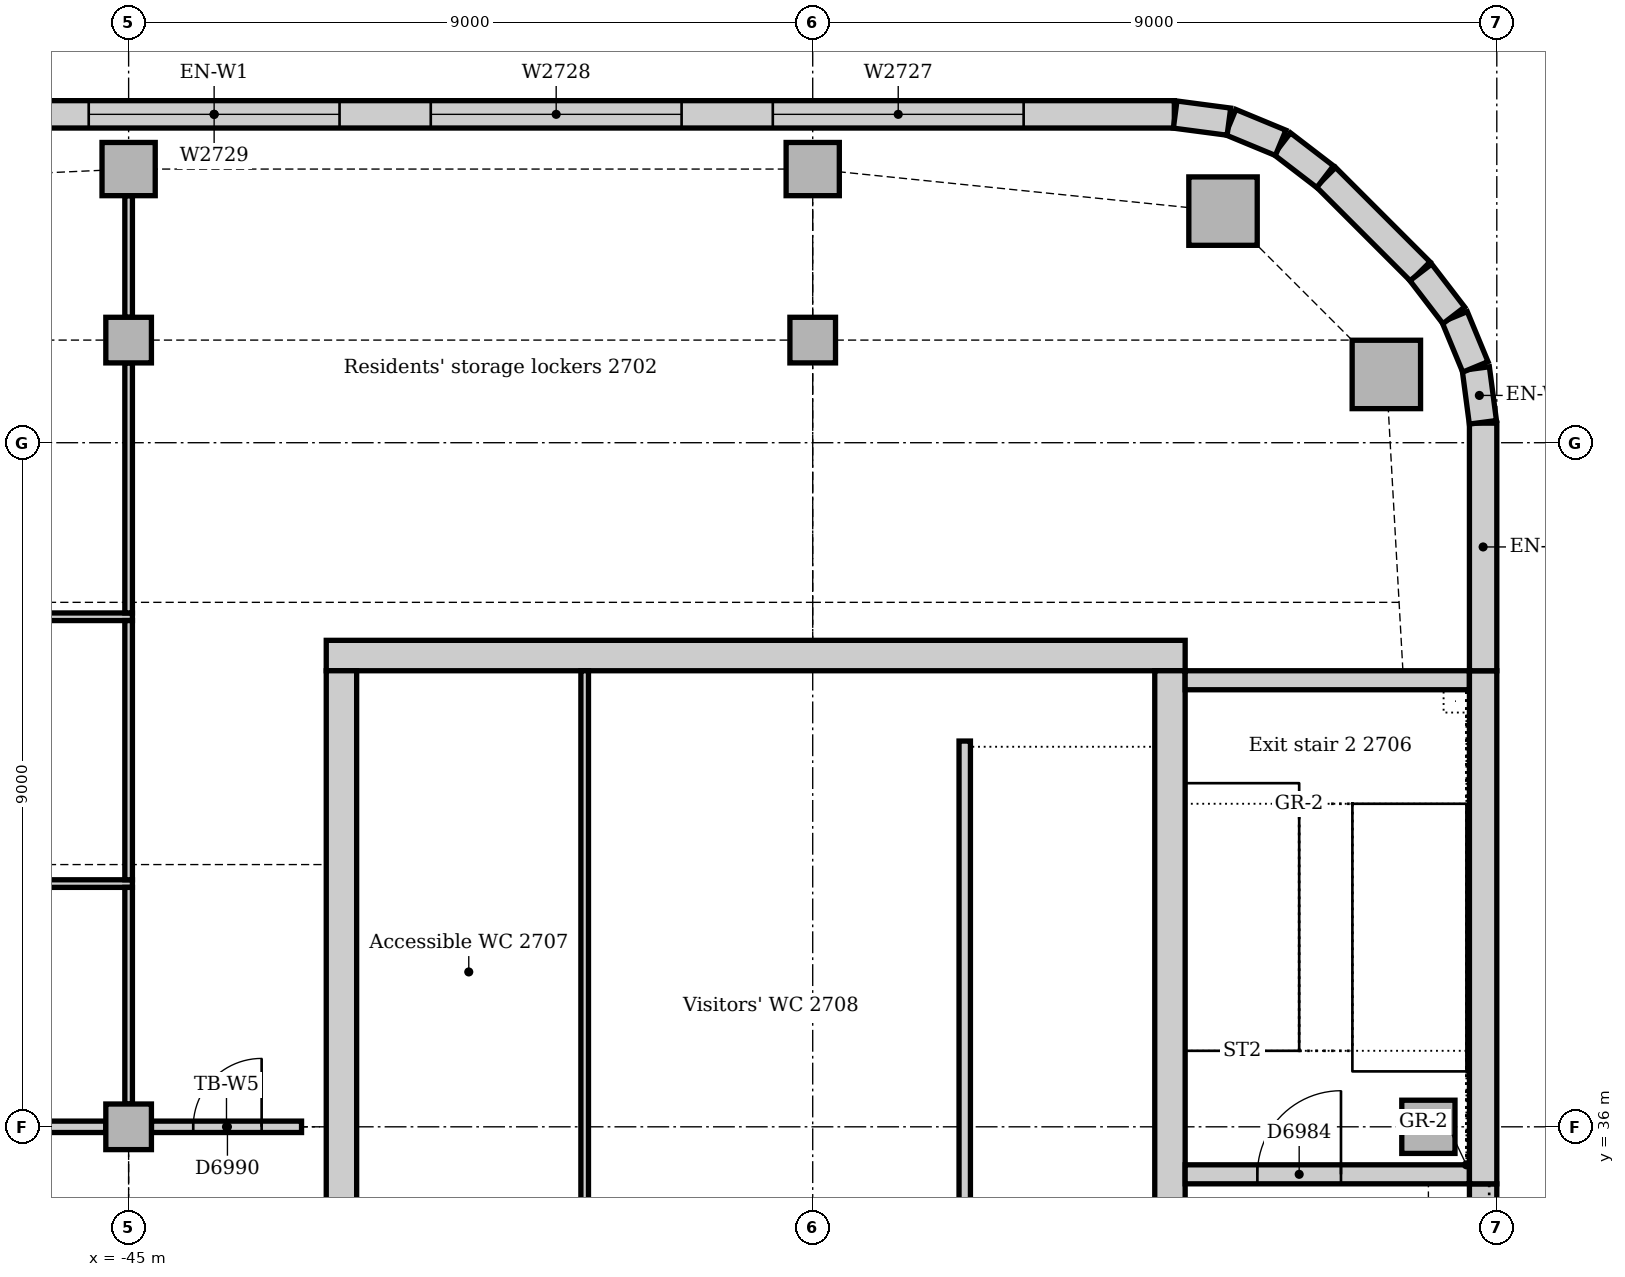
"""IFC4 building model, lengths in metres.
Left out: names, types, materials, properties, quantities, classifications, styles, units other than length and angle.
Written with IfcOpenShell. Run it as: python <this file> out.ifc"""

import sys

from ifc_helpers import new_model, si_unit, direction, frame, frame_2d, origin, origin_2d, place, context, subcontext, project, spatial, rectangle, extrude, element, fill, save


model = new_model("IFC4")
c1 = context("Model", 3, precision=1e-05, world=origin(), true_north=direction((0.0, 1.0)))
c2 = subcontext(c1, "Body", "Model", "MODEL_VIEW")
j1 = project(units=[si_unit("LENGTHUNIT", "METRE"), si_unit("PLANEANGLEUNIT", "RADIAN")], contexts=[c1])
p1 = place(None, origin())
s1 = spatial("IfcSite", under=j1, at=p1, CompositionType="ELEMENT")
p2 = place(p1, origin())
s2 = spatial("IfcBuilding", under=s1, at=p2, CompositionType="ELEMENT")
p3 = place(p2, frame((0.0, 0.0, 116.0)))
s3 = spatial("IfcBuildingStorey", under=s2, at=p3, CompositionType="ELEMENT", Elevation=116.0)
p4 = place(p3, frame((-31.1, 42.2, 0.0), z_axis=(0.0, 0.0, 1.0), x_axis=(-1.0, 0.0, 0.0)))
e1 = element("IfcWall", 1, at=p4, inside=s3, PredefinedType="SOLIDWALL", context=c2, shape_type="SweptSolid", body=[
    extrude(rectangle(XDim=11.3, YDim=0.4, at=frame_2d((5.65, 0.0))), origin(), (0.0, 0.0, 1.0), 4.0),
])
p5 = place(p3, frame((-31.3, 30.5, 0.0), z_axis=(0.0, 0.0, 1.0), x_axis=(0.0, 1.0, 0.0)))
e2 = element("IfcWall", 2, at=p5, inside=s3, PredefinedType="SOLIDWALL", context=c2, shape_type="SweptSolid", body=[
    extrude(rectangle(XDim=11.5, YDim=0.4, at=frame_2d((5.75, 0.0))), origin(), (0.0, 0.0, 1.0), 4.0),
])
p6 = place(p5, frame((0.85, 0.0, 0.0)))
e3 = element("IfcOpeningElement", 3, at=p6, cuts=e2, PredefinedType="OPENING", context=c2, shape_type="SweptSolid", body=[
    extrude(rectangle(XDim=1.8, YDim=2.1, at=frame_2d((0.9, 1.05))), frame((0.0, 0.21, 0.0), z_axis=(0.0, -1.0, 0.0), x_axis=(1.0, 0.0, 0.0)), (0.0, 0.0, 1.0), 0.42),
])
p7 = place(p3, frame((-42.2, 42.0, 0.0), z_axis=(0.0, 0.0, 1.0), x_axis=(0.0, -1.0, 0.0)))
e4 = element("IfcWall", 4, at=p7, inside=s3, PredefinedType="SOLIDWALL", context=c2, shape_type="SweptSolid", body=[
    extrude(rectangle(XDim=11.5, YDim=0.4, at=frame_2d((5.75, 0.0))), origin(), (0.0, 0.0, 1.0), 4.0),
])
p8 = place(p7, frame((8.85, 0.0, 0.0)))
e5 = element("IfcOpeningElement", 5, at=p8, cuts=e4, PredefinedType="OPENING", context=c2, shape_type="SweptSolid", body=[
    extrude(rectangle(XDim=1.8, YDim=2.1, at=frame_2d((0.9, 1.05))), frame((0.0, 0.21, 0.0), z_axis=(0.0, -1.0, 0.0), x_axis=(1.0, 0.0, 0.0)), (0.0, 0.0, 1.0), 0.42),
])
p9 = place(p3, frame((-31.1, 35.375, 0.0), z_axis=(0.0, 0.0, 1.0), x_axis=(1.0, 0.0, 0.0)))
e6 = element("IfcWall", 6, at=p9, inside=s3, PredefinedType="SOLIDWALL", context=c2, shape_type="SweptSolid", body=[
    extrude(rectangle(XDim=3.74, YDim=0.25, at=frame_2d((1.87, 0.0))), origin(), (0.0, 0.0, 1.0), 4.0),
])
p10 = place(p9, frame((0.95, 0.0, 0.0)))
e7 = element("IfcOpeningElement", 7, at=p10, cuts=e6, PredefinedType="OPENING", context=c2, shape_type="SweptSolid", body=[
    extrude(rectangle(XDim=1.1, YDim=2.1, at=frame_2d((0.55, 1.05))), frame((0.0, 0.135, 0.0), z_axis=(0.0, -1.0, 0.0), x_axis=(1.0, 0.0, 0.0)), (0.0, 0.0, 1.0), 0.27),
])
p11 = place(p3, frame((-27.36, 41.875, 0.0), z_axis=(0.0, 0.0, 1.0), x_axis=(-1.0, 0.0, 0.0)))
e8 = element("IfcWall", 8, at=p11, inside=s3, PredefinedType="SOLIDWALL", context=c2, shape_type="SweptSolid", body=[
    extrude(rectangle(XDim=3.74, YDim=0.25, at=frame_2d((1.87, 0.0))), origin(), (0.0, 0.0, 1.0), 4.0),
])
for number, where, z_axis, x_axis in (
    (9, (-28.453, 45.898, 0.0), (0.0, 0.0, 1.0), (1.0, 0.0, 0.0)),
    (10, (-30.602, 48.047, 0.0), (0.0, 0.0, 1.0), (1.0, 0.0, 0.0)),
):
    element("IfcColumn", number, at=place(p3, frame(where, z_axis=z_axis, x_axis=x_axis)), inside=s3, PredefinedType="COLUMN", context=c2, shape_type="SweptSolid", body=[
        extrude(rectangle(XDim=0.9, YDim=0.9, at=origin_2d()), origin(), (0.0, 0.0, 1.0), 3.85),
    ])
p12 = place(p3, frame((-27.9, 36.0, 0.0), z_axis=(0.0, 0.0, 1.0), x_axis=(1.0, 0.0, 0.0)))
e11 = element("IfcColumn", 11, at=p12, inside=s3, PredefinedType="COLUMN", context=c2, shape_type="SweptSolid", body=[
    extrude(rectangle(XDim=0.7, YDim=0.7, at=origin_2d()), origin(), (0.0, 0.0, 1.0), 4.0),
])
for number, where, z_axis, x_axis in (
    (12, (-45.0, 48.6, 0.0), (0.0, 0.0, 1.0), (1.0, 0.0, 0.0)),
    (13, (-36.0, 48.6, 0.0), (0.0, 0.0, 1.0), (1.0, 0.0, 0.0)),
):
    element("IfcColumn", number, at=place(p3, frame(where, z_axis=z_axis, x_axis=x_axis)), inside=s3, PredefinedType="COLUMN", context=c2, shape_type="SweptSolid", body=[
        extrude(rectangle(XDim=0.7, YDim=0.7, at=origin_2d()), origin(), (0.0, 0.0, 1.0), 3.85),
    ])
for number, where, z_axis, x_axis in (
    (14, (-45.0, 36.0, 0.0), (0.0, 0.0, 1.0), (1.0, 0.0, 0.0)),
    (15, (-45.0, 46.35, 0.0), (0.0, 0.0, 1.0), (1.0, 0.0, 0.0)),
    (16, (-36.0, 46.35, 0.0), (0.0, 0.0, 1.0), (1.0, 0.0, 0.0)),
):
    element("IfcColumn", number, at=place(p3, frame(where, z_axis=z_axis, x_axis=x_axis)), inside=s3, PredefinedType="COLUMN", context=c2, shape_type="SweptSolid", body=[
        extrude(rectangle(XDim=0.6, YDim=0.6, at=origin_2d()), origin(), (0.0, 0.0, 1.0), 3.85),
    ])
p13 = place(p3, frame((-27.18, 27.75, 0.0), z_axis=(0.0, 0.0, 1.0), x_axis=(0.0, 1.0, 0.0)))
e17 = element("IfcWall", 17, at=p13, inside=s3, PredefinedType="STANDARD", context=c2, shape_type="SweptSolid", body=[
    extrude(rectangle(XDim=7.5, YDim=0.36, at=frame_2d((3.75, 0.0))), origin(), (0.0, 0.0, 1.0), 3.85),
])
p14 = place(p13, frame((2.85, 0.0, 1.2)))
e18 = element("IfcOpeningElement", 18, at=p14, cuts=e17, PredefinedType="OPENING", context=c2, shape_type="SweptSolid", body=[
    extrude(rectangle(XDim=1.8, YDim=1.2, at=frame_2d((0.9, 0.6))), frame((0.0, 0.19, 0.0), z_axis=(0.0, -1.0, 0.0), x_axis=(1.0, 0.0, 0.0)), (0.0, 0.0, 1.0), 0.38),
])
p15 = place(p3, frame((-27.18, 35.25, 0.0), z_axis=(0.0, 0.0, 1.0), x_axis=(0.0, 1.0, 0.0)))
e19 = element("IfcWall", 19, at=p15, inside=s3, PredefinedType="STANDARD", context=c2, shape_type="SweptSolid", body=[
    extrude(rectangle(XDim=6.75, YDim=0.36, at=frame_2d((3.375, 0.0))), origin(), (0.0, 0.0, 1.0), 3.85),
])
p16 = place(p3, frame((-27.18, 42.0, 0.0), z_axis=(0.0, 0.0, 1.0), x_axis=(0.0, 1.0, 0.0)))
e20 = element("IfcWall", 20, at=p16, inside=s3, PredefinedType="STANDARD", context=c2, shape_type="SweptSolid", body=[
    extrude(rectangle(XDim=3.257, YDim=0.36, at=frame_2d((1.629, 0.0))), origin(), (0.0, 0.0, 1.0), 3.85),
])
p17 = place(p3, frame((-28.006, 47.251, 0.0), z_axis=(0.0, 0.0, 1.0), x_axis=(-0.707106781187, 0.707106781187, 0.0)))
e21 = element("IfcWall", 21, at=p17, inside=s3, PredefinedType="STANDARD", context=c2, shape_type="SweptSolid", body=[
    extrude(rectangle(XDim=1.757, YDim=0.36, at=frame_2d((0.879, 0.0))), origin(), (0.0, 0.0, 1.0), 3.85),
])
p18 = place(p3, frame((-31.243, 49.32, 0.0), z_axis=(0.0, 0.0, 1.0), x_axis=(-1.0, 0.0, 0.0)))
e22 = element("IfcWall", 22, at=p18, inside=s3, PredefinedType="STANDARD", context=c2, shape_type="SweptSolid", body=[
    extrude(rectangle(XDim=25.265, YDim=0.36, at=frame_2d((12.632, 0.0))), origin(), (0.0, 0.0, 1.0), 3.85),
])
p19 = place(p18, frame((1.982, 0.0, 0.9)))
e23 = element("IfcOpeningElement", 23, at=p19, cuts=e22, PredefinedType="OPENING", context=c2, shape_type="SweptSolid", body=[
    extrude(rectangle(XDim=3.3, YDim=1.6, at=frame_2d((1.65, 0.8))), frame((0.0, 0.19, 0.0), z_axis=(0.0, -1.0, 0.0), x_axis=(1.0, 0.0, 0.0)), (0.0, 0.0, 1.0), 0.38),
])
p20 = place(p18, frame((6.482, 0.0, 0.9)))
e24 = element("IfcOpeningElement", 24, at=p20, cuts=e22, PredefinedType="OPENING", context=c2, shape_type="SweptSolid", body=[
    extrude(rectangle(XDim=3.3, YDim=1.6, at=frame_2d((1.65, 0.8))), frame((0.0, 0.19, 0.0), z_axis=(0.0, -1.0, 0.0), x_axis=(1.0, 0.0, 0.0)), (0.0, 0.0, 1.0), 0.38),
])
p21 = place(p18, frame((10.982, 0.0, 0.9)))
e25 = element("IfcOpeningElement", 25, at=p21, cuts=e22, PredefinedType="OPENING", context=c2, shape_type="SweptSolid", body=[
    extrude(rectangle(XDim=3.3, YDim=1.6, at=frame_2d((1.65, 0.8))), frame((0.0, 0.19, 0.0), z_axis=(0.0, -1.0, 0.0), x_axis=(1.0, 0.0, 0.0)), (0.0, 0.0, 1.0), 0.38),
])
p22 = place(p18, frame((15.482, 0.0, 0.9)))
e26 = element("IfcOpeningElement", 26, at=p22, cuts=e22, PredefinedType="OPENING", context=c2, shape_type="SweptSolid", body=[
    extrude(rectangle(XDim=3.3, YDim=1.6, at=frame_2d((1.65, 0.8))), frame((0.0, 0.19, 0.0), z_axis=(0.0, -1.0, 0.0), x_axis=(1.0, 0.0, 0.0)), (0.0, 0.0, 1.0), 0.38),
])
p23 = place(p18, frame((19.982, 0.0, 0.9)))
e27 = element("IfcOpeningElement", 27, at=p23, cuts=e22, PredefinedType="OPENING", context=c2, shape_type="SweptSolid", body=[
    extrude(rectangle(XDim=3.3, YDim=1.6, at=frame_2d((1.65, 0.8))), frame((0.0, 0.19, 0.0), z_axis=(0.0, -1.0, 0.0), x_axis=(1.0, 0.0, 0.0)), (0.0, 0.0, 1.0), 0.38),
])
for number, where, z_axis, x_axis in (
    (28, (-27.183, 45.269, 0.0), (0.0, 0.0, 1.0), (-0.131, 0.991, 0.0)),
    (29, (-27.282, 45.997, 0.0), (0.0, 0.0, 1.0), (-0.383, 0.924, 0.0)),
):
    element("IfcWall", number, at=place(p3, frame(where, z_axis=z_axis, x_axis=x_axis)), inside=s3, PredefinedType="STANDARD", context=c2, shape_type="SweptSolid", body=[
        extrude(rectangle(XDim=0.713, YDim=0.36, at=frame_2d((0.356, 0.0))), origin(), (0.0, 0.0, 1.0), 3.85),
    ])
for number, where, z_axis, x_axis in (
    (30, (-27.566, 46.675, 0.0), (0.0, 0.0, 1.0), (-0.609, 0.793, 0.0)),
    (31, (-29.259, 48.5, 0.0), (0.0, 0.0, 1.0), (-0.793, 0.609, 0.0)),
):
    element("IfcWall", number, at=place(p3, frame(where, z_axis=z_axis, x_axis=x_axis)), inside=s3, PredefinedType="STANDARD", context=c2, shape_type="SweptSolid", body=[
        extrude(rectangle(XDim=0.713, YDim=0.36, at=frame_2d((0.357, 0.0))), origin(), (0.0, 0.0, 1.0), 3.85),
    ])
for number, where, z_axis, x_axis in (
    (32, (-29.844, 48.945, 0.0), (0.0, 0.0, 1.0), (-0.924, 0.383, 0.0)),
    (33, (-30.524, 49.224, 0.0), (0.0, 0.0, 1.0), (-0.991, 0.131, 0.0)),
):
    element("IfcWall", number, at=place(p3, frame(where, z_axis=z_axis, x_axis=x_axis)), inside=s3, PredefinedType="STANDARD", context=c2, shape_type="SweptSolid", body=[
        extrude(rectangle(XDim=0.713, YDim=0.36, at=frame_2d((0.356, 0.0))), origin(), (0.0, 0.0, 1.0), 3.85),
    ])
p24 = place(p3, frame((-34.0, 41.075, 0.0), z_axis=(0.0, 0.0, 1.0), x_axis=(0.0, -1.0, 0.0)))
e34 = element("IfcWall", 34, at=p24, inside=s3, PredefinedType="SOLIDWALL", context=c2, shape_type="SweptSolid", body=[
    extrude(rectangle(XDim=7.0, YDim=0.15, at=frame_2d((3.5, 0.0))), origin(), (0.0, 0.0, 1.0), 4.0),
])
p25 = place(p3, frame((-39.0, 34.075, 0.0), z_axis=(0.0, 0.0, 1.0), x_axis=(0.0, 1.0, 0.0)))
e35 = element("IfcWall", 35, at=p25, inside=s3, PredefinedType="PARTITIONING", context=c2, shape_type="SweptSolid", body=[
    extrude(rectangle(XDim=7.925, YDim=0.1, at=frame_2d((3.962, 0.0))), origin(), (0.0, 0.0, 1.0), 3.85),
])
p26 = place(p3, frame((-44.7, 36.0, 0.0), z_axis=(0.0, 0.0, 1.0), x_axis=(1.0, 0.0, 0.0)))
e36 = element("IfcWall", 36, at=p26, inside=s3, PredefinedType="PARTITIONING", context=c2, shape_type="SweptSolid", body=[
    extrude(rectangle(XDim=1.975, YDim=0.15, at=frame_2d((0.988, 0.0))), origin(), (0.0, 0.0, 1.0), 3.602),
])
p27 = place(p26, frame((0.55, 0.0, 0.0)))
e37 = element("IfcOpeningElement", 37, at=p27, cuts=e36, PredefinedType="OPENING", context=c2, shape_type="SweptSolid", body=[
    extrude(rectangle(XDim=0.9, YDim=2.1, at=frame_2d((0.45, 1.05))), frame((0.0, 0.085, 0.0), z_axis=(0.0, -1.0, 0.0), x_axis=(1.0, 0.0, 0.0)), (0.0, 0.0, 1.0), 0.17),
])
p28 = place(p3, frame((-53.7, 36.0, 0.0), z_axis=(0.0, 0.0, 1.0), x_axis=(1.0, 0.0, 0.0)))
e38 = element("IfcWall", 38, at=p28, inside=s3, PredefinedType="PARTITIONING", context=c2, shape_type="SweptSolid", body=[
    extrude(rectangle(XDim=8.4, YDim=0.15, at=frame_2d((4.2, 0.0))), origin(), (0.0, 0.0, 1.0), 3.262),
])
p29 = place(p28, frame((0.3, 0.0, 0.0)))
e39 = element("IfcOpeningElement", 39, at=p29, cuts=e38, PredefinedType="OPENING", context=c2, shape_type="SweptSolid", body=[
    extrude(rectangle(XDim=1.0, YDim=2.1, at=frame_2d((0.5, 1.05))), frame((0.0, 0.085, 0.0), z_axis=(0.0, -1.0, 0.0), x_axis=(1.0, 0.0, 0.0)), (0.0, 0.0, 1.0), 0.17),
])
p30 = place(p3, frame((-60.39, 39.2, 0.0), z_axis=(0.0, 0.0, 1.0), x_axis=(1.0, 0.0, 0.0)))
e40 = element("IfcWall", 40, at=p30, inside=s3, PredefinedType="PARTITIONING", context=c2, shape_type="SweptSolid", body=[
    extrude(rectangle(XDim=15.44, YDim=0.1, at=frame_2d((7.72, 0.0))), origin(), (0.0, 0.0, 1.0), 3.85),
])
p31 = place(p30, frame((6.021, 0.0, 0.0)))
e41 = element("IfcOpeningElement", 41, at=p31, cuts=e40, PredefinedType="OPENING", context=c2, shape_type="SweptSolid", body=[
    extrude(rectangle(XDim=0.9, YDim=2.1, at=frame_2d((0.45, 1.05))), frame((0.0, 0.06, 0.0), z_axis=(0.0, -1.0, 0.0), x_axis=(1.0, 0.0, 0.0)), (0.0, 0.0, 1.0), 0.12),
])
p32 = place(p3, frame((-60.39, 42.71, 0.0), z_axis=(0.0, 0.0, 1.0), x_axis=(1.0, 0.0, 0.0)))
e42 = element("IfcWall", 42, at=p32, inside=s3, PredefinedType="PARTITIONING", context=c2, shape_type="SweptSolid", body=[
    extrude(rectangle(XDim=15.44, YDim=0.1, at=frame_2d((7.72, 0.0))), origin(), (0.0, 0.0, 1.0), 3.85),
])
p33 = place(p32, frame((4.5, 0.0, 0.0)))
e43 = element("IfcOpeningElement", 43, at=p33, cuts=e42, PredefinedType="OPENING", context=c2, shape_type="SweptSolid", body=[
    extrude(rectangle(XDim=0.9, YDim=2.1, at=frame_2d((0.45, 1.05))), frame((0.0, 0.06, 0.0), z_axis=(0.0, -1.0, 0.0), x_axis=(1.0, 0.0, 0.0)), (0.0, 0.0, 1.0), 0.12),
])
p34 = place(p32, frame((12.06, 0.0, 0.0)))
e44 = element("IfcOpeningElement", 44, at=p34, cuts=e42, PredefinedType="OPENING", context=c2, shape_type="SweptSolid", body=[
    extrude(rectangle(XDim=0.9, YDim=2.1, at=frame_2d((0.45, 1.05))), frame((0.0, 0.06, 0.0), z_axis=(0.0, -1.0, 0.0), x_axis=(1.0, 0.0, 0.0)), (0.0, 0.0, 1.0), 0.12),
])
p35 = place(p3, frame((-45.0, 42.76, 0.0), z_axis=(0.0, 0.0, 1.0), x_axis=(0.0, 1.0, 0.0)))
e45 = element("IfcWall", 45, at=p35, inside=s3, PredefinedType="PARTITIONING", context=c2, shape_type="SweptSolid", body=[
    extrude(rectangle(XDim=3.29, YDim=0.1, at=frame_2d((1.645, 0.0))), origin(), (0.0, 0.0, 1.0), 3.362),
])
p36 = place(p3, frame((-45.0, 39.25, 0.0), z_axis=(0.0, 0.0, 1.0), x_axis=(0.0, 1.0, 0.0)))
e46 = element("IfcWall", 46, at=p36, inside=s3, PredefinedType="PARTITIONING", context=c2, shape_type="SweptSolid", body=[
    extrude(rectangle(XDim=3.41, YDim=0.1, at=frame_2d((1.705, 0.0))), origin(), (0.0, 0.0, 1.0), 3.362),
])
p37 = place(p3, frame((-45.0, 36.3, 0.0), z_axis=(0.0, 0.0, 1.0), x_axis=(0.0, 1.0, 0.0)))
e47 = element("IfcWall", 47, at=p37, inside=s3, PredefinedType="PARTITIONING", context=c2, shape_type="SweptSolid", body=[
    extrude(rectangle(XDim=2.85, YDim=0.1, at=frame_2d((1.425, 0.0))), origin(), (0.0, 0.0, 1.0), 3.362),
])
p38 = place(p3, frame((-45.0, 46.65, 0.0), z_axis=(0.0, 0.0, 1.0), x_axis=(0.0, 1.0, 0.0)))
e48 = element("IfcWall", 48, at=p38, inside=s3, PredefinedType="PARTITIONING", context=c2, shape_type="SweptSolid", body=[
    extrude(rectangle(XDim=1.6, YDim=0.1, at=frame_2d((0.8, 0.0))), origin(), (0.0, 0.0, 1.0), 3.652),
])
p39 = place(p19, origin())
e49 = element("IfcWindow", 49, at=p39, inside=s3, PartitioningType="SINGLE_PANEL", PredefinedType="WINDOW", context=c2, shape_type="SweptSolid", body=[
    extrude(rectangle(XDim=3.3, YDim=1.6, at=frame_2d((1.65, 0.8))), frame((0.0, 0.13, 0.0), z_axis=(0.0, -1.0, 0.0), x_axis=(1.0, 0.0, 0.0)), (0.0, 0.0, 1.0), 0.06),
])
fill(e23, e49)
p40 = place(p20, origin())
e50 = element("IfcWindow", 50, at=p40, inside=s3, PartitioningType="SINGLE_PANEL", PredefinedType="WINDOW", context=c2, shape_type="SweptSolid", body=[
    extrude(rectangle(XDim=3.3, YDim=1.6, at=frame_2d((1.65, 0.8))), frame((0.0, 0.13, 0.0), z_axis=(0.0, -1.0, 0.0), x_axis=(1.0, 0.0, 0.0)), (0.0, 0.0, 1.0), 0.06),
])
fill(e24, e50)
p41 = place(p21, origin())
e51 = element("IfcWindow", 51, at=p41, inside=s3, PartitioningType="SINGLE_PANEL", PredefinedType="WINDOW", context=c2, shape_type="SweptSolid", body=[
    extrude(rectangle(XDim=3.3, YDim=1.6, at=frame_2d((1.65, 0.8))), frame((0.0, 0.13, 0.0), z_axis=(0.0, -1.0, 0.0), x_axis=(1.0, 0.0, 0.0)), (0.0, 0.0, 1.0), 0.06),
])
fill(e25, e51)
p42 = place(p10, origin())
e52 = element("IfcDoor", 52, at=p42, inside=s3, OperationType="SINGLE_SWING_RIGHT", PredefinedType="DOOR", context=c2, shape_type="SweptSolid", body=[
    extrude(rectangle(XDim=1.1, YDim=2.1, at=frame_2d((0.55, 1.05))), frame((0.0, 0.025, 0.0), z_axis=(0.0, -1.0, 0.0), x_axis=(1.0, 0.0, 0.0)), (0.0, 0.0, 1.0), 0.05),
])
fill(e7, e52)
p43 = place(p27, origin())
e53 = element("IfcDoor", 53, at=p43, inside=s3, OperationType="SINGLE_SWING_RIGHT", PredefinedType="DOOR", context=c2, shape_type="SweptSolid", body=[
    extrude(rectangle(XDim=0.9, YDim=2.1, at=frame_2d((0.45, 1.05))), frame((0.0, 0.025, 0.0), z_axis=(0.0, -1.0, 0.0), x_axis=(1.0, 0.0, 0.0)), (0.0, 0.0, 1.0), 0.05),
])
fill(e37, e53)
save(model, sys.argv[1])
